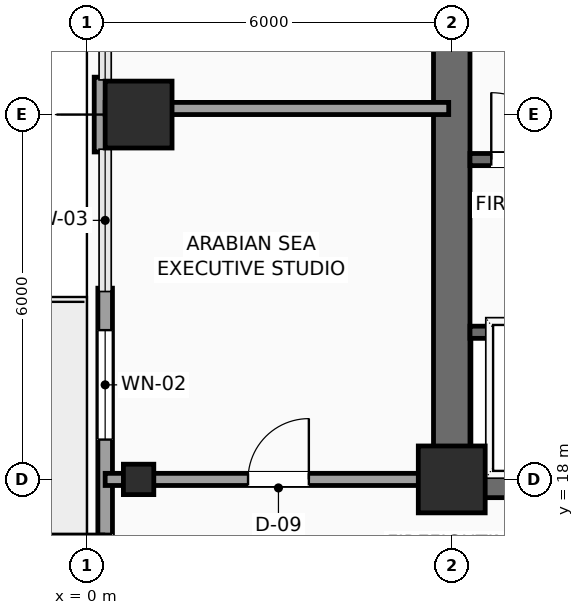
"""IFC4 building model, lengths in metres.
Left out: names, types, materials, properties, quantities, classifications, styles, units other than length and angle.
Written with IfcOpenShell. Run it as: python <this file> out.ifc"""

import sys

from ifc_helpers import new_model, si_unit, direction, frame, frame_2d, origin, origin_2d, place, context, subcontext, project, spatial, rectangle, hollow_rectangle, extrude, element, fill, save


model = new_model("IFC4")
c1 = context("Model", 3, precision=1e-05, world=origin(), true_north=direction((0.0, 1.0)))
c2 = subcontext(c1, "Body", "Model", "MODEL_VIEW")
j1 = project(units=[si_unit("LENGTHUNIT", "METRE"), si_unit("PLANEANGLEUNIT", "RADIAN")], contexts=[c1])
p1 = place(None, origin())
s1 = spatial("IfcSite", under=j1, at=p1, CompositionType="ELEMENT")
p2 = place(p1, origin())
s2 = spatial("IfcBuilding", under=s1, at=p2, CompositionType="ELEMENT")
p3 = place(p2, frame((0.0, 0.0, 115.65)))
s3 = spatial("IfcBuildingStorey", under=s2, at=p3, CompositionType="ELEMENT", Elevation=115.65)
p4 = place(p3, frame((6.0, 18.0, 0.0), z_axis=(0.0, 0.0, 1.0), x_axis=(1.0, 0.0, 0.0)))
e1 = element("IfcColumn", 1, at=p4, inside=s3, PredefinedType="COLUMN", context=c2, shape_type="SweptSolid", body=[
    extrude(rectangle(XDim=1.1, YDim=1.1, at=origin_2d()), origin(), (0.0, 0.0, 1.0), 3.75),
])
p5 = place(p3, frame((0.85, 18.0, 0.0), z_axis=(0.0, 0.0, 1.0), x_axis=(1.0, 0.0, 0.0)))
e2 = element("IfcColumn", 2, at=p5, inside=s3, PredefinedType="COLUMN", context=c2, shape_type="SweptSolid", body=[
    extrude(hollow_rectangle(XDim=0.5, YDim=0.5, WallThickness=0.025, InnerFilletRadius=0.025, OuterFilletRadius=0.04, at=origin_2d()), origin(), (0.0, 0.0, 1.0), 3.75),
])
p6 = place(p3, frame((0.85, 24.0, 0.0), z_axis=(0.0, 0.0, 1.0), x_axis=(1.0, 0.0, 0.0)))
e3 = element("IfcColumn", 3, at=p6, inside=s3, PredefinedType="COLUMN", context=c2, shape_type="SweptSolid", body=[
    extrude(rectangle(XDim=1.1, YDim=1.1, at=origin_2d()), origin(), (0.0, 0.0, 1.0), 3.75),
])
p7 = place(p3, frame((0.3, 11.855, 0.0), z_axis=(0.0, 0.0, 1.0), x_axis=(0.0, 1.0, 0.0)))
e4 = element("IfcWall", 4, at=p7, inside=s3, PredefinedType="SOLIDWALL", context=c2, shape_type="SweptSolid", body=[
    extrude(rectangle(XDim=9.29, YDim=0.24, at=frame_2d((4.645, 0.0))), origin(), (0.0, 0.0, 1.0), 3.525),
])
p8 = place(p7, frame((4.2, 0.0, 0.0)))
e5 = element("IfcOpeningElement", 5, at=p8, cuts=e4, PredefinedType="OPENING", context=c2, shape_type="SweptSolid", body=[
    extrude(rectangle(XDim=1.05, YDim=2.2, at=frame_2d((0.525, 1.1))), frame((0.0, 0.13, 0.0), z_axis=(0.0, -1.0, 0.0), x_axis=(1.0, 0.0, 0.0)), (0.0, 0.0, 1.0), 0.26),
])
p9 = place(p7, frame((6.8, 0.0, 0.85)))
e6 = element("IfcOpeningElement", 6, at=p9, cuts=e4, PredefinedType="OPENING", context=c2, shape_type="SweptSolid", body=[
    extrude(rectangle(XDim=1.8, YDim=2.1, at=frame_2d((0.9, 1.05))), frame((0.0, 0.13, 0.0), z_axis=(0.0, -1.0, 0.0), x_axis=(1.0, 0.0, 0.0)), (0.0, 0.0, 1.0), 0.26),
])
p10 = place(p3, frame((0.24, 23.385, 0.0), z_axis=(0.0, 0.0, 1.0), x_axis=(0.0, 1.0, 0.0)))
e7 = element("IfcWall", 7, at=p10, inside=s3, PredefinedType="SOLIDWALL", context=c2, shape_type="SweptSolid", body=[
    extrude(rectangle(XDim=1.23, YDim=0.24, at=frame_2d((0.615, 0.0))), origin(), (0.0, 0.0, 1.0), 3.525),
])
p11 = place(p3, frame((6.0, 18.0, 0.0), z_axis=(0.0, 0.0, 1.0), x_axis=(1.0, 0.0, 0.0)))
e8 = element("IfcWall", 8, at=p11, inside=s3, PredefinedType="SHEAR", context=c2, shape_type="SweptSolid", body=[
    extrude(rectangle(XDim=12.0, YDim=0.6, at=frame_2d((6.0, 0.0))), origin(), (0.0, 0.0, 1.0), 3.525),
])
p12 = place(p11, frame((7.15, 0.0, 0.0)))
e9 = element("IfcOpeningElement", 9, at=p12, cuts=e8, PredefinedType="OPENING", context=c2, shape_type="SweptSolid", body=[
    extrude(rectangle(XDim=1.6, YDim=2.3, at=frame_2d((0.8, 1.15))), frame((0.0, 0.31, 0.0), z_axis=(0.0, -1.0, 0.0), x_axis=(1.0, 0.0, 0.0)), (0.0, 0.0, 1.0), 0.62),
])
p13 = place(p3, frame((6.0, 18.0, 0.0), z_axis=(0.0, 0.0, 1.0), x_axis=(0.0, 1.0, 0.0)))
e10 = element("IfcWall", 10, at=p13, inside=s3, PredefinedType="SHEAR", context=c2, shape_type="SweptSolid", body=[
    extrude(rectangle(XDim=9.6, YDim=0.6, at=frame_2d((4.8, 0.0))), origin(), (0.0, 0.0, 1.0), 3.525),
])
p14 = place(p3, frame((6.3, 23.26, 0.0), z_axis=(0.0, 0.0, 1.0), x_axis=(1.0, 0.0, 0.0)))
e11 = element("IfcWall", 11, at=p14, inside=s3, PredefinedType="SHEAR", context=c2, shape_type="SweptSolid", body=[
    extrude(rectangle(XDim=8.88, YDim=0.2, at=frame_2d((4.44, 0.0))), origin(), (0.0, 0.0, 1.0), 3.525),
])
p15 = place(p14, frame((0.35, 0.0, 0.0)))
e12 = element("IfcOpeningElement", 12, at=p15, cuts=e11, PredefinedType="OPENING", context=c2, shape_type="SweptSolid", body=[
    extrude(rectangle(XDim=1.1, YDim=2.2, at=frame_2d((0.55, 1.1))), frame((0.0, 0.11, 0.0), z_axis=(0.0, -1.0, 0.0), x_axis=(1.0, 0.0, 0.0)), (0.0, 0.0, 1.0), 0.22),
])
p16 = place(p3, frame((6.3, 20.42, 0.0), z_axis=(0.0, 0.0, 1.0), x_axis=(1.0, 0.0, 0.0)))
e13 = element("IfcWall", 13, at=p16, inside=s3, PredefinedType="SHEAR", context=c2, shape_type="SweptSolid", body=[
    extrude(rectangle(XDim=4.95, YDim=0.2, at=frame_2d((2.475, 0.0))), origin(), (0.0, 0.0, 1.0), 3.525),
])
p17 = place(p16, frame((0.65, 0.0, 0.0)))
e14 = element("IfcOpeningElement", 14, at=p17, cuts=e13, PredefinedType="OPENING", context=c2, shape_type="SweptSolid", body=[
    extrude(rectangle(XDim=1.1, YDim=2.2, at=frame_2d((0.55, 1.1))), frame((0.0, 0.11, 0.0), z_axis=(0.0, -1.0, 0.0), x_axis=(1.0, 0.0, 0.0)), (0.0, 0.0, 1.0), 0.22),
])
p18 = place(p16, frame((3.05, 0.0, 0.0)))
e15 = element("IfcOpeningElement", 15, at=p18, cuts=e13, PredefinedType="OPENING", context=c2, shape_type="SweptSolid", body=[
    extrude(rectangle(XDim=1.1, YDim=2.2, at=frame_2d((0.55, 1.1))), frame((0.0, 0.11, 0.0), z_axis=(0.0, -1.0, 0.0), x_axis=(1.0, 0.0, 0.0)), (0.0, 0.0, 1.0), 0.22),
])
p19 = place(p3, frame((0.3, 18.0, 0.0), z_axis=(0.0, 0.0, 1.0), x_axis=(1.0, 0.0, 0.0)))
e16 = element("IfcWall", 16, at=p19, inside=s3, PredefinedType="PARTITIONING", context=c2, shape_type="SweptSolid", body=[
    extrude(rectangle(XDim=5.65, YDim=0.2, at=frame_2d((2.825, 0.0))), origin(), (0.0, 0.0, 1.0), 3.017),
])
p20 = place(p19, frame((2.35, 0.0, 0.0)))
e17 = element("IfcOpeningElement", 17, at=p20, cuts=e16, PredefinedType="OPENING", context=c2, shape_type="SweptSolid", body=[
    extrude(rectangle(XDim=1.0, YDim=2.2, at=frame_2d((0.5, 1.1))), frame((0.0, 0.11, 0.0), z_axis=(0.0, -1.0, 0.0), x_axis=(1.0, 0.0, 0.0)), (0.0, 0.0, 1.0), 0.22),
])
p21 = place(p3, frame((0.3, 24.1, 0.0), z_axis=(0.0, 0.0, 1.0), x_axis=(1.0, 0.0, 0.0)))
e18 = element("IfcWall", 18, at=p21, inside=s3, PredefinedType="PARTITIONING", context=c2, shape_type="SweptSolid", body=[
    extrude(rectangle(XDim=5.65, YDim=0.2, at=frame_2d((2.825, 0.0))), origin(), (0.0, 0.0, 1.0), 3.525),
])
p22 = place(p8, origin())
e19 = element("IfcDoor", 19, at=p22, inside=s3, OperationType="SINGLE_SWING_RIGHT", PredefinedType="DOOR", context=c2, shape_type="SweptSolid", body=[
    extrude(rectangle(XDim=1.05, YDim=2.2, at=frame_2d((0.525, 1.1))), frame((0.0, 0.025, 0.0), z_axis=(0.0, -1.0, 0.0), x_axis=(1.0, 0.0, 0.0)), (0.0, 0.0, 1.0), 0.05),
])
fill(e5, e19)
p23 = place(p9, origin())
e20 = element("IfcWindow", 20, at=p23, inside=s3, PartitioningType="SINGLE_PANEL", PredefinedType="WINDOW", context=c2, shape_type="SweptSolid", body=[
    extrude(rectangle(XDim=1.8, YDim=2.1, at=frame_2d((0.9, 1.05))), frame((0.0, 0.03, 0.0), z_axis=(0.0, -1.0, 0.0), x_axis=(1.0, 0.0, 0.0)), (0.0, 0.0, 1.0), 0.06),
])
fill(e6, e20)
p24 = place(p15, origin())
e21 = element("IfcDoor", 21, at=p24, inside=s3, OperationType="SINGLE_SWING_LEFT", PredefinedType="DOOR", context=c2, shape_type="SweptSolid", body=[
    extrude(rectangle(XDim=1.1, YDim=2.2, at=frame_2d((0.55, 1.1))), frame((0.0, 0.025, 0.0), z_axis=(0.0, -1.0, 0.0), x_axis=(1.0, 0.0, 0.0)), (0.0, 0.0, 1.0), 0.05),
])
fill(e12, e21)
p25 = place(p20, origin())
e22 = element("IfcDoor", 22, at=p25, inside=s3, OperationType="SINGLE_SWING_RIGHT", PredefinedType="DOOR", context=c2, shape_type="SweptSolid", body=[
    extrude(rectangle(XDim=1.0, YDim=2.2, at=frame_2d((0.5, 1.1))), frame((0.0, 0.025, 0.0), z_axis=(0.0, -1.0, 0.0), x_axis=(1.0, 0.0, 0.0)), (0.0, 0.0, 1.0), 0.05),
])
fill(e17, e22)
save(model, sys.argv[1])
